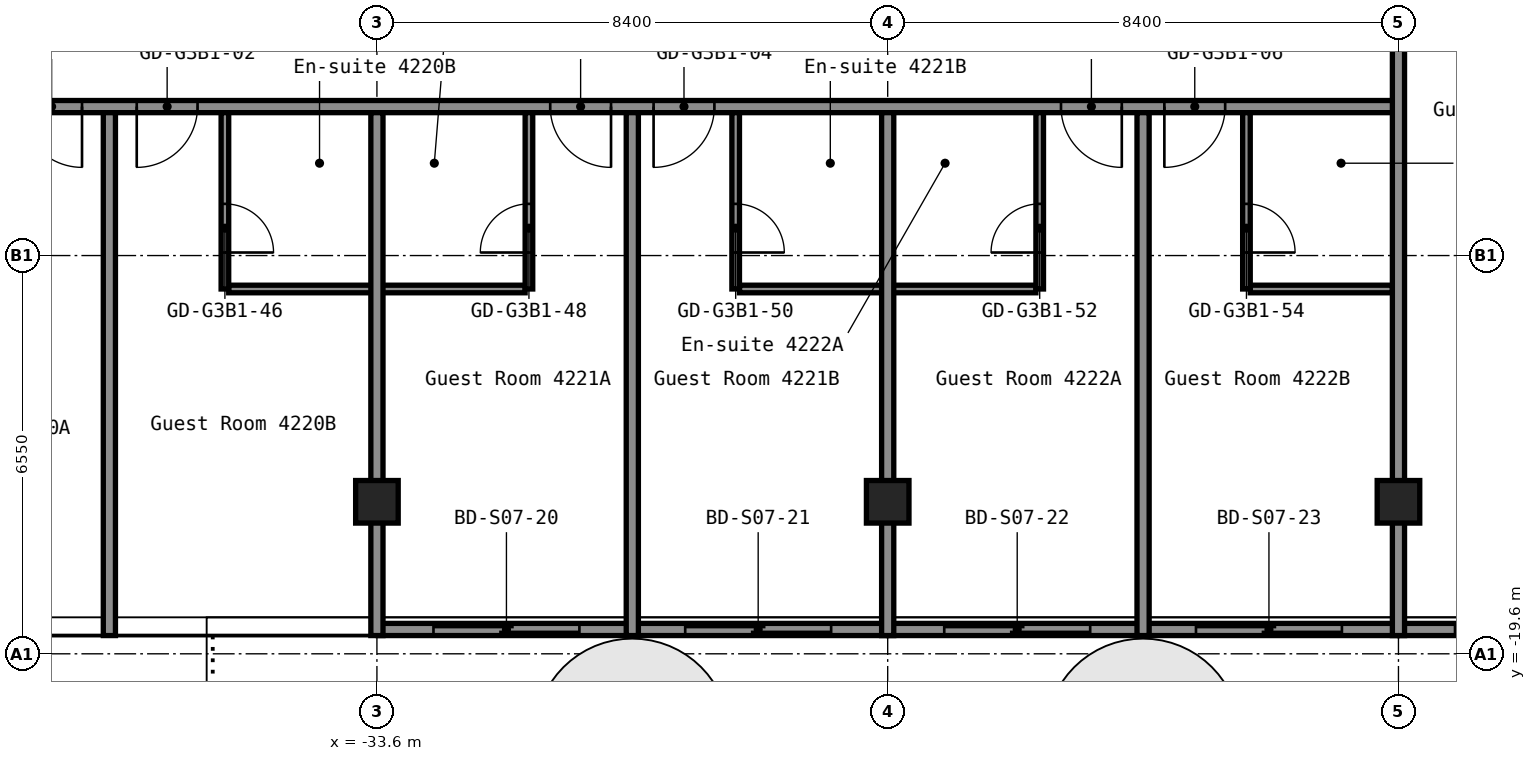
"""IFC4 building model, lengths in metres.
Left out: names, types, materials, properties, quantities, classifications, styles, units other than length and angle.
Written with IfcOpenShell. Run it as: python <this file> out.ifc"""

import sys

from ifc_helpers import new_model, si_unit, direction, frame, frame_2d, origin, origin_2d, place, context, subcontext, project, spatial, rectangle, hollow_rectangle, extrude, element, fill, save


model = new_model("IFC4")
c1 = context("Model", 3, precision=1e-05, world=origin(), true_north=direction((0.0, 1.0)))
c2 = subcontext(c1, "Body", "Model", "MODEL_VIEW")
j1 = project(units=[si_unit("LENGTHUNIT", "METRE"), si_unit("PLANEANGLEUNIT", "RADIAN")], contexts=[c1])
p1 = place(None, origin())
s1 = spatial("IfcSite", under=j1, at=p1, CompositionType="ELEMENT")
p2 = place(p1, origin())
s2 = spatial("IfcBuilding", under=s1, at=p2, CompositionType="ELEMENT")
p3 = place(p2, frame((0.0, 0.0, 150.2)))
s3 = spatial("IfcBuildingStorey", under=s2, at=p3, CompositionType="ELEMENT", Elevation=150.2)
for number, where, z_axis, x_axis in (
    (1, (-33.6, -17.1, 0.0), (0.0, 0.0, 1.0), (1.0, 0.0, 0.0)),
    (2, (-25.2, -17.1, 0.0), (0.0, 0.0, 1.0), (1.0, 0.0, 0.0)),
    (3, (-16.8, -17.1, 0.0), (0.0, 0.0, 1.0), (1.0, 0.0, 0.0)),
):
    element("IfcColumn", number, at=place(p3, frame(where, z_axis=z_axis, x_axis=x_axis)), inside=s3, PredefinedType="COLUMN", context=c2, shape_type="SweptSolid", body=[
        extrude(hollow_rectangle(XDim=0.7, YDim=0.7, WallThickness=0.028, at=origin_2d()), origin(), (0.0, 0.0, 1.0), 2.75),
    ])
for number, where, z_axis, x_axis in (
    (4, (-36.038, -13.6, 0.0), (0.0, 0.0, 1.0), (1.0, 0.0, 0.0)),
    (5, (-27.637, -13.6, 0.0), (0.0, 0.0, 1.0), (1.0, 0.0, 0.0)),
):
    element("IfcWall", number, at=place(p3, frame(where, z_axis=z_axis, x_axis=x_axis)), inside=s3, PredefinedType="PARTITIONING", context=c2, shape_type="SweptSolid", body=[
        extrude(rectangle(XDim=4.875, YDim=0.125, at=frame_2d((2.438, 0.0))), origin(), (0.0, 0.0, 1.0), 2.75),
    ])
p4 = place(p3, frame((-19.238, -13.6, 0.0), z_axis=(0.0, 0.0, 1.0), x_axis=(1.0, 0.0, 0.0)))
e6 = element("IfcWall", 6, at=p4, inside=s3, PredefinedType="PARTITIONING", context=c2, shape_type="SweptSolid", body=[
    extrude(rectangle(XDim=2.338, YDim=0.125, at=frame_2d((1.169, 0.0))), origin(), (0.0, 0.0, 1.0), 2.75),
])
p5 = place(p3, frame((-42.7, -10.6, 0.0), z_axis=(0.0, 0.0, 1.0), x_axis=(1.0, 0.0, 0.0)))
e7 = element("IfcWall", 7, at=p5, inside=s3, PredefinedType="PARTITIONING", context=c2, shape_type="SweptSolid", body=[
    extrude(rectangle(XDim=25.9, YDim=0.2, at=frame_2d((12.95, 0.0))), origin(), (0.0, 0.0, 1.0), 2.75),
])
p6 = place(p5, frame((3.25, 0.0, 0.0)))
e8 = element("IfcOpeningElement", 8, at=p6, cuts=e7, PredefinedType="OPENING", context=c2, shape_type="SweptSolid", body=[
    extrude(rectangle(XDim=1.0, YDim=2.1, at=frame_2d((0.5, 1.05))), frame((0.0, 0.11, 0.0), z_axis=(0.0, -1.0, 0.0), x_axis=(1.0, 0.0, 0.0)), (0.0, 0.0, 1.0), 0.22),
])
p7 = place(p5, frame((5.15, 0.0, 0.0)))
e9 = element("IfcOpeningElement", 9, at=p7, cuts=e7, PredefinedType="OPENING", context=c2, shape_type="SweptSolid", body=[
    extrude(rectangle(XDim=1.0, YDim=2.1, at=frame_2d((0.5, 1.05))), frame((0.0, 0.11, 0.0), z_axis=(0.0, -1.0, 0.0), x_axis=(1.0, 0.0, 0.0)), (0.0, 0.0, 1.0), 0.22),
])
p8 = place(p5, frame((11.95, 0.0, 0.0)))
e10 = element("IfcOpeningElement", 10, at=p8, cuts=e7, PredefinedType="OPENING", context=c2, shape_type="SweptSolid", body=[
    extrude(rectangle(XDim=1.0, YDim=2.1, at=frame_2d((0.5, 1.05))), frame((0.0, 0.11, 0.0), z_axis=(0.0, -1.0, 0.0), x_axis=(1.0, 0.0, 0.0)), (0.0, 0.0, 1.0), 0.22),
])
p9 = place(p5, frame((13.65, 0.0, 0.0)))
e11 = element("IfcOpeningElement", 11, at=p9, cuts=e7, PredefinedType="OPENING", context=c2, shape_type="SweptSolid", body=[
    extrude(rectangle(XDim=1.0, YDim=2.1, at=frame_2d((0.5, 1.05))), frame((0.0, 0.11, 0.0), z_axis=(0.0, -1.0, 0.0), x_axis=(1.0, 0.0, 0.0)), (0.0, 0.0, 1.0), 0.22),
])
p10 = place(p5, frame((20.35, 0.0, 0.0)))
e12 = element("IfcOpeningElement", 12, at=p10, cuts=e7, PredefinedType="OPENING", context=c2, shape_type="SweptSolid", body=[
    extrude(rectangle(XDim=1.0, YDim=2.1, at=frame_2d((0.5, 1.05))), frame((0.0, 0.11, 0.0), z_axis=(0.0, -1.0, 0.0), x_axis=(1.0, 0.0, 0.0)), (0.0, 0.0, 1.0), 0.22),
])
p11 = place(p5, frame((22.05, 0.0, 0.0)))
e13 = element("IfcOpeningElement", 13, at=p11, cuts=e7, PredefinedType="OPENING", context=c2, shape_type="SweptSolid", body=[
    extrude(rectangle(XDim=1.0, YDim=2.1, at=frame_2d((0.5, 1.05))), frame((0.0, 0.11, 0.0), z_axis=(0.0, -1.0, 0.0), x_axis=(1.0, 0.0, 0.0)), (0.0, 0.0, 1.0), 0.22),
])
p12 = place(p3, frame((-38.0, -19.3, 0.0), z_axis=(0.0, 0.0, 1.0), x_axis=(0.0, 1.0, 0.0)))
e14 = element("IfcWall", 14, at=p12, inside=s3, PredefinedType="PARTITIONING", context=c2, shape_type="SweptSolid", body=[
    extrude(rectangle(XDim=8.6, YDim=0.2, at=frame_2d((4.3, 0.0))), origin(), (0.0, 0.0, 1.0), 2.75),
])
p13 = place(p3, frame((-36.1, -13.6, 0.0), z_axis=(0.0, 0.0, 1.0), x_axis=(0.0, 1.0, 0.0)))
e15 = element("IfcWall", 15, at=p13, inside=s3, PredefinedType="PARTITIONING", context=c2, shape_type="SweptSolid", body=[
    extrude(rectangle(XDim=2.9, YDim=0.125, at=frame_2d((1.45, 0.0))), origin(), (0.0, 0.0, 1.0), 2.75),
])
p14 = place(p13, frame((0.6, 0.0, 0.0)))
e16 = element("IfcOpeningElement", 16, at=p14, cuts=e15, PredefinedType="OPENING", context=c2, shape_type="SweptSolid", body=[
    extrude(rectangle(XDim=0.8, YDim=2.1, at=frame_2d((0.4, 1.05))), frame((0.0, 0.073, 0.0), z_axis=(0.0, -1.0, 0.0), x_axis=(1.0, 0.0, 0.0)), (0.0, 0.0, 1.0), 0.145),
])
p15 = place(p3, frame((-33.6, -19.3, 0.0), z_axis=(0.0, 0.0, 1.0), x_axis=(0.0, 1.0, 0.0)))
e17 = element("IfcWall", 17, at=p15, inside=s3, PredefinedType="PARTITIONING", context=c2, shape_type="SweptSolid", body=[
    extrude(rectangle(XDim=8.6, YDim=0.2, at=frame_2d((4.3, 0.0))), origin(), (0.0, 0.0, 1.0), 2.75),
])
p16 = place(p3, frame((-31.1, -13.6, 0.0), z_axis=(0.0, 0.0, 1.0), x_axis=(0.0, 1.0, 0.0)))
e18 = element("IfcWall", 18, at=p16, inside=s3, PredefinedType="PARTITIONING", context=c2, shape_type="SweptSolid", body=[
    extrude(rectangle(XDim=2.9, YDim=0.125, at=frame_2d((1.45, 0.0))), origin(), (0.0, 0.0, 1.0), 2.75),
])
p17 = place(p16, frame((0.6, 0.0, 0.0)))
e19 = element("IfcOpeningElement", 19, at=p17, cuts=e18, PredefinedType="OPENING", context=c2, shape_type="SweptSolid", body=[
    extrude(rectangle(XDim=0.8, YDim=2.1, at=frame_2d((0.4, 1.05))), frame((0.0, 0.073, 0.0), z_axis=(0.0, -1.0, 0.0), x_axis=(1.0, 0.0, 0.0)), (0.0, 0.0, 1.0), 0.145),
])
p18 = place(p3, frame((-29.4, -19.3, 0.0), z_axis=(0.0, 0.0, 1.0), x_axis=(0.0, 1.0, 0.0)))
e20 = element("IfcWall", 20, at=p18, inside=s3, PredefinedType="PARTITIONING", context=c2, shape_type="SweptSolid", body=[
    extrude(rectangle(XDim=8.6, YDim=0.2, at=frame_2d((4.3, 0.0))), origin(), (0.0, 0.0, 1.0), 2.75),
])
p19 = place(p3, frame((-27.7, -13.6, 0.0), z_axis=(0.0, 0.0, 1.0), x_axis=(0.0, 1.0, 0.0)))
e21 = element("IfcWall", 21, at=p19, inside=s3, PredefinedType="PARTITIONING", context=c2, shape_type="SweptSolid", body=[
    extrude(rectangle(XDim=2.9, YDim=0.125, at=frame_2d((1.45, 0.0))), origin(), (0.0, 0.0, 1.0), 2.75),
])
p20 = place(p19, frame((0.6, 0.0, 0.0)))
e22 = element("IfcOpeningElement", 22, at=p20, cuts=e21, PredefinedType="OPENING", context=c2, shape_type="SweptSolid", body=[
    extrude(rectangle(XDim=0.8, YDim=2.1, at=frame_2d((0.4, 1.05))), frame((0.0, 0.073, 0.0), z_axis=(0.0, -1.0, 0.0), x_axis=(1.0, 0.0, 0.0)), (0.0, 0.0, 1.0), 0.145),
])
p21 = place(p3, frame((-25.2, -19.3, 0.0), z_axis=(0.0, 0.0, 1.0), x_axis=(0.0, 1.0, 0.0)))
e23 = element("IfcWall", 23, at=p21, inside=s3, PredefinedType="PARTITIONING", context=c2, shape_type="SweptSolid", body=[
    extrude(rectangle(XDim=8.6, YDim=0.2, at=frame_2d((4.3, 0.0))), origin(), (0.0, 0.0, 1.0), 2.75),
])
p22 = place(p3, frame((-22.7, -13.6, 0.0), z_axis=(0.0, 0.0, 1.0), x_axis=(0.0, 1.0, 0.0)))
e24 = element("IfcWall", 24, at=p22, inside=s3, PredefinedType="PARTITIONING", context=c2, shape_type="SweptSolid", body=[
    extrude(rectangle(XDim=2.9, YDim=0.125, at=frame_2d((1.45, 0.0))), origin(), (0.0, 0.0, 1.0), 2.75),
])
p23 = place(p22, frame((0.6, 0.0, 0.0)))
e25 = element("IfcOpeningElement", 25, at=p23, cuts=e24, PredefinedType="OPENING", context=c2, shape_type="SweptSolid", body=[
    extrude(rectangle(XDim=0.8, YDim=2.1, at=frame_2d((0.4, 1.05))), frame((0.0, 0.073, 0.0), z_axis=(0.0, -1.0, 0.0), x_axis=(1.0, 0.0, 0.0)), (0.0, 0.0, 1.0), 0.145),
])
p24 = place(p3, frame((-21.0, -19.3, 0.0), z_axis=(0.0, 0.0, 1.0), x_axis=(0.0, 1.0, 0.0)))
e26 = element("IfcWall", 26, at=p24, inside=s3, PredefinedType="PARTITIONING", context=c2, shape_type="SweptSolid", body=[
    extrude(rectangle(XDim=8.6, YDim=0.2, at=frame_2d((4.3, 0.0))), origin(), (0.0, 0.0, 1.0), 2.75),
])
p25 = place(p3, frame((-19.3, -13.6, 0.0), z_axis=(0.0, 0.0, 1.0), x_axis=(0.0, 1.0, 0.0)))
e27 = element("IfcWall", 27, at=p25, inside=s3, PredefinedType="PARTITIONING", context=c2, shape_type="SweptSolid", body=[
    extrude(rectangle(XDim=2.9, YDim=0.125, at=frame_2d((1.45, 0.0))), origin(), (0.0, 0.0, 1.0), 2.75),
])
p26 = place(p25, frame((0.6, 0.0, 0.0)))
e28 = element("IfcOpeningElement", 28, at=p26, cuts=e27, PredefinedType="OPENING", context=c2, shape_type="SweptSolid", body=[
    extrude(rectangle(XDim=0.8, YDim=2.1, at=frame_2d((0.4, 1.05))), frame((0.0, 0.073, 0.0), z_axis=(0.0, -1.0, 0.0), x_axis=(1.0, 0.0, 0.0)), (0.0, 0.0, 1.0), 0.145),
])
p27 = place(p3, frame((-16.8, -19.3, 0.0), z_axis=(0.0, 0.0, 1.0), x_axis=(0.0, 1.0, 0.0)))
e29 = element("IfcWall", 29, at=p27, inside=s3, PredefinedType="PARTITIONING", context=c2, shape_type="SweptSolid", body=[
    extrude(rectangle(XDim=10.91, YDim=0.2, at=frame_2d((5.455, 0.0))), origin(), (0.0, 0.0, 1.0), 2.75),
])
p28 = place(p3, frame((-33.58, -19.2, 0.0), z_axis=(0.0, 0.0, 1.0), x_axis=(1.0, 0.0, 0.0)))
p29 = place(p28, frame((0.91, 0.0, 0.0)))
p30 = place(p29, frame((2.4, 0.0, 0.0), z_axis=(0.0, 0.0, 1.0), x_axis=(-1.0, 0.0, 0.0)))
e30 = element("IfcDoor", 30, at=p30, inside=s3, OperationType="SLIDING_TO_LEFT", PredefinedType="DOOR", context=c2, shape_type="SweptSolid", body=[
    extrude(rectangle(XDim=2.4, YDim=2.2, at=frame_2d((1.2, 1.1))), frame((0.0, 0.025, 0.0), z_axis=(0.0, -1.0, 0.0), x_axis=(1.0, 0.0, 0.0)), (0.0, 0.0, 1.0), 0.05),
])
p31 = place(p3, frame((-29.44, -19.2, 0.0), z_axis=(0.0, 0.0, 1.0), x_axis=(1.0, 0.0, 0.0)))
p32 = place(p31, frame((0.91, 0.0, 0.0)))
p33 = place(p32, frame((2.4, 0.0, 0.0), z_axis=(0.0, 0.0, 1.0), x_axis=(-1.0, 0.0, 0.0)))
e31 = element("IfcDoor", 31, at=p33, inside=s3, OperationType="SLIDING_TO_LEFT", PredefinedType="DOOR", context=c2, shape_type="SweptSolid", body=[
    extrude(rectangle(XDim=2.4, YDim=2.2, at=frame_2d((1.2, 1.1))), frame((0.0, 0.025, 0.0), z_axis=(0.0, -1.0, 0.0), x_axis=(1.0, 0.0, 0.0)), (0.0, 0.0, 1.0), 0.05),
])
p34 = place(p3, frame((-25.18, -19.2, 0.0), z_axis=(0.0, 0.0, 1.0), x_axis=(1.0, 0.0, 0.0)))
p35 = place(p34, frame((0.91, 0.0, 0.0)))
p36 = place(p35, frame((2.4, 0.0, 0.0), z_axis=(0.0, 0.0, 1.0), x_axis=(-1.0, 0.0, 0.0)))
e32 = element("IfcDoor", 32, at=p36, inside=s3, OperationType="SLIDING_TO_LEFT", PredefinedType="DOOR", context=c2, shape_type="SweptSolid", body=[
    extrude(rectangle(XDim=2.4, YDim=2.2, at=frame_2d((1.2, 1.1))), frame((0.0, 0.025, 0.0), z_axis=(0.0, -1.0, 0.0), x_axis=(1.0, 0.0, 0.0)), (0.0, 0.0, 1.0), 0.05),
])
p37 = place(p3, frame((-21.04, -19.2, 0.0), z_axis=(0.0, 0.0, 1.0), x_axis=(1.0, 0.0, 0.0)))
p38 = place(p37, frame((0.91, 0.0, 0.0)))
p39 = place(p38, frame((2.4, 0.0, 0.0), z_axis=(0.0, 0.0, 1.0), x_axis=(-1.0, 0.0, 0.0)))
e33 = element("IfcDoor", 33, at=p39, inside=s3, OperationType="SLIDING_TO_LEFT", PredefinedType="DOOR", context=c2, shape_type="SweptSolid", body=[
    extrude(rectangle(XDim=2.4, YDim=2.2, at=frame_2d((1.2, 1.1))), frame((0.0, 0.025, 0.0), z_axis=(0.0, -1.0, 0.0), x_axis=(1.0, 0.0, 0.0)), (0.0, 0.0, 1.0), 0.05),
])
p40 = place(p3, frame((-16.78, -19.2, 0.0), z_axis=(0.0, 0.0, 1.0), x_axis=(1.0, 0.0, 0.0)))
p41 = place(p40, frame((0.91, 0.0, 0.0)))
p42 = place(p41, frame((2.4, 0.0, 0.0), z_axis=(0.0, 0.0, 1.0), x_axis=(-1.0, 0.0, 0.0)))
e34 = element("IfcDoor", 34, at=p42, inside=s3, OperationType="SLIDING_TO_LEFT", PredefinedType="DOOR", context=c2, shape_type="SweptSolid", body=[
    extrude(rectangle(XDim=2.4, YDim=2.2, at=frame_2d((1.2, 1.1))), frame((0.0, 0.025, 0.0), z_axis=(0.0, -1.0, 0.0), x_axis=(1.0, 0.0, 0.0)), (0.0, 0.0, 1.0), 0.05),
])
p43 = place(p6, origin())
e35 = element("IfcDoor", 35, at=p43, inside=s3, OperationType="SINGLE_SWING_RIGHT", PredefinedType="DOOR", context=c2, shape_type="SweptSolid", body=[
    extrude(rectangle(XDim=1.0, YDim=2.1, at=frame_2d((0.5, 1.05))), frame((0.0, 0.025, 0.0), z_axis=(0.0, -1.0, 0.0), x_axis=(1.0, 0.0, 0.0)), (0.0, 0.0, 1.0), 0.05),
])
fill(e8, e35)
p44 = place(p7, origin())
e36 = element("IfcDoor", 36, at=p44, inside=s3, OperationType="SINGLE_SWING_LEFT", PredefinedType="DOOR", context=c2, shape_type="SweptSolid", body=[
    extrude(rectangle(XDim=1.0, YDim=2.1, at=frame_2d((0.5, 1.05))), frame((0.0, 0.025, 0.0), z_axis=(0.0, -1.0, 0.0), x_axis=(1.0, 0.0, 0.0)), (0.0, 0.0, 1.0), 0.05),
])
fill(e9, e36)
p45 = place(p8, origin())
e37 = element("IfcDoor", 37, at=p45, inside=s3, OperationType="SINGLE_SWING_RIGHT", PredefinedType="DOOR", context=c2, shape_type="SweptSolid", body=[
    extrude(rectangle(XDim=1.0, YDim=2.1, at=frame_2d((0.5, 1.05))), frame((0.0, 0.025, 0.0), z_axis=(0.0, -1.0, 0.0), x_axis=(1.0, 0.0, 0.0)), (0.0, 0.0, 1.0), 0.05),
])
fill(e10, e37)
p46 = place(p9, origin())
e38 = element("IfcDoor", 38, at=p46, inside=s3, OperationType="SINGLE_SWING_LEFT", PredefinedType="DOOR", context=c2, shape_type="SweptSolid", body=[
    extrude(rectangle(XDim=1.0, YDim=2.1, at=frame_2d((0.5, 1.05))), frame((0.0, 0.025, 0.0), z_axis=(0.0, -1.0, 0.0), x_axis=(1.0, 0.0, 0.0)), (0.0, 0.0, 1.0), 0.05),
])
fill(e11, e38)
p47 = place(p10, origin())
e39 = element("IfcDoor", 39, at=p47, inside=s3, OperationType="SINGLE_SWING_RIGHT", PredefinedType="DOOR", context=c2, shape_type="SweptSolid", body=[
    extrude(rectangle(XDim=1.0, YDim=2.1, at=frame_2d((0.5, 1.05))), frame((0.0, 0.025, 0.0), z_axis=(0.0, -1.0, 0.0), x_axis=(1.0, 0.0, 0.0)), (0.0, 0.0, 1.0), 0.05),
])
fill(e12, e39)
p48 = place(p11, origin())
e40 = element("IfcDoor", 40, at=p48, inside=s3, OperationType="SINGLE_SWING_LEFT", PredefinedType="DOOR", context=c2, shape_type="SweptSolid", body=[
    extrude(rectangle(XDim=1.0, YDim=2.1, at=frame_2d((0.5, 1.05))), frame((0.0, 0.025, 0.0), z_axis=(0.0, -1.0, 0.0), x_axis=(1.0, 0.0, 0.0)), (0.0, 0.0, 1.0), 0.05),
])
fill(e13, e40)
p49 = place(p14, origin())
e41 = element("IfcDoor", 41, at=p49, inside=s3, OperationType="SINGLE_SWING_LEFT", PredefinedType="DOOR", context=c2, shape_type="SweptSolid", body=[
    extrude(rectangle(XDim=0.8, YDim=2.1, at=frame_2d((0.4, 1.05))), frame((0.0, 0.025, 0.0), z_axis=(0.0, -1.0, 0.0), x_axis=(1.0, 0.0, 0.0)), (0.0, 0.0, 1.0), 0.05),
])
fill(e16, e41)
p50 = place(p17, origin())
e42 = element("IfcDoor", 42, at=p50, inside=s3, OperationType="SINGLE_SWING_RIGHT", PredefinedType="DOOR", context=c2, shape_type="SweptSolid", body=[
    extrude(rectangle(XDim=0.8, YDim=2.1, at=frame_2d((0.4, 1.05))), frame((0.0, 0.025, 0.0), z_axis=(0.0, -1.0, 0.0), x_axis=(1.0, 0.0, 0.0)), (0.0, 0.0, 1.0), 0.05),
])
fill(e19, e42)
p51 = place(p20, origin())
e43 = element("IfcDoor", 43, at=p51, inside=s3, OperationType="SINGLE_SWING_LEFT", PredefinedType="DOOR", context=c2, shape_type="SweptSolid", body=[
    extrude(rectangle(XDim=0.8, YDim=2.1, at=frame_2d((0.4, 1.05))), frame((0.0, 0.025, 0.0), z_axis=(0.0, -1.0, 0.0), x_axis=(1.0, 0.0, 0.0)), (0.0, 0.0, 1.0), 0.05),
])
fill(e22, e43)
p52 = place(p23, origin())
e44 = element("IfcDoor", 44, at=p52, inside=s3, OperationType="SINGLE_SWING_RIGHT", PredefinedType="DOOR", context=c2, shape_type="SweptSolid", body=[
    extrude(rectangle(XDim=0.8, YDim=2.1, at=frame_2d((0.4, 1.05))), frame((0.0, 0.025, 0.0), z_axis=(0.0, -1.0, 0.0), x_axis=(1.0, 0.0, 0.0)), (0.0, 0.0, 1.0), 0.05),
])
fill(e25, e44)
p53 = place(p26, origin())
e45 = element("IfcDoor", 45, at=p53, inside=s3, OperationType="SINGLE_SWING_LEFT", PredefinedType="DOOR", context=c2, shape_type="SweptSolid", body=[
    extrude(rectangle(XDim=0.8, YDim=2.1, at=frame_2d((0.4, 1.05))), frame((0.0, 0.025, 0.0), z_axis=(0.0, -1.0, 0.0), x_axis=(1.0, 0.0, 0.0)), (0.0, 0.0, 1.0), 0.05),
])
fill(e28, e45)
save(model, sys.argv[1])
